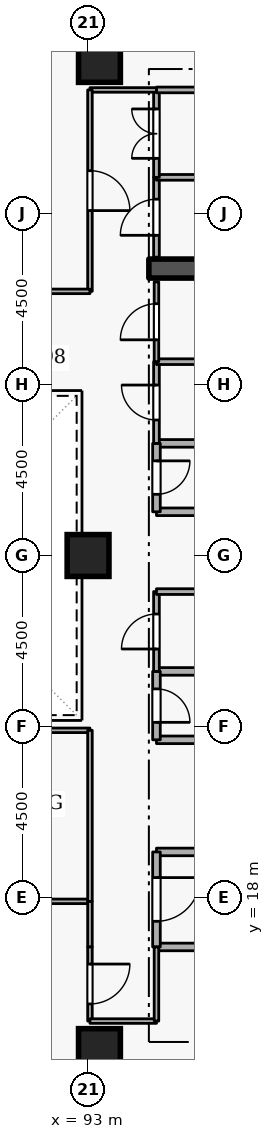
"""IFC4 building model, lengths in metres.
Left out: names, types, materials, properties, quantities, classifications, styles, units other than length and angle.
Written with IfcOpenShell. Run it as: python <this file> out.ifc"""

import sys

from ifc_helpers import new_model, si_unit, direction, frame, frame_2d, origin, origin_2d, place, context, subcontext, project, spatial, rectangle, extrude, element, fill, save


model = new_model("IFC4")
c1 = context("Model", 3, precision=1e-05, world=origin(), true_north=direction((0.0, 1.0)))
c2 = subcontext(c1, "Body", "Model", "MODEL_VIEW")
j1 = project(units=[si_unit("LENGTHUNIT", "METRE"), si_unit("PLANEANGLEUNIT", "RADIAN")], contexts=[c1])
p1 = place(None, origin())
s1 = spatial("IfcSite", under=j1, at=p1, CompositionType="ELEMENT")
p2 = place(p1, origin())
s2 = spatial("IfcBuilding", under=s1, at=p2, CompositionType="ELEMENT")
p3 = place(p2, frame((0.0, 0.0, 185.7)))
s3 = spatial("IfcBuildingStorey", under=s2, at=p3, CompositionType="ELEMENT", Elevation=185.7)
p4 = place(p3, frame((94.6, 34.55, 0.0), z_axis=(0.0, 0.0, 1.0), x_axis=(1.0, 0.0, 0.0)))
e1 = element("IfcWall", 1, at=p4, inside=s3, PredefinedType="SHEAR", context=c2, shape_type="SweptSolid", body=[
    extrude(rectangle(XDim=5.8, YDim=0.5, at=frame_2d((2.9, 0.0))), origin(), (0.0, 0.0, 1.0), 3.6),
])
for number, where, z_axis, x_axis in (
    (2, (93.3, 14.0, 0.0), (0.0, 0.0, 1.0), (1.0, 0.0, 0.0)),
    (3, (93.3, 40.0, 0.0), (0.0, 0.0, 1.0), (1.0, 0.0, 0.0)),
    (4, (93.0, 27.0, 0.0), (0.0, 0.0, 1.0), (1.0, 0.0, 0.0)),
):
    element("IfcColumn", number, at=place(p3, frame(where, z_axis=z_axis, x_axis=x_axis)), inside=s3, PredefinedType="COLUMN", context=c2, shape_type="SweptSolid", body=[
        extrude(rectangle(XDim=1.1, YDim=1.1, at=origin_2d()), origin(), (0.0, 0.0, 1.0), 3.6),
    ])
p5 = place(p3, frame((94.8, 16.7, 0.0), z_axis=(0.0, 0.0, 1.0), x_axis=(1.0, 0.0, 0.0)))
e5 = element("IfcWall", 5, at=p5, inside=s3, PredefinedType="STANDARD", context=c2, shape_type="SweptSolid", body=[
    extrude(rectangle(XDim=5.7, YDim=0.2, at=frame_2d((2.85, 0.0))), origin(), (0.0, 0.0, 1.0), 3.34),
])
p6 = place(p3, frame((97.1, 19.2, 0.0), z_axis=(0.0, 0.0, 1.0), x_axis=(-1.0, 0.0, 0.0)))
e6 = element("IfcWall", 6, at=p6, inside=s3, PredefinedType="STANDARD", context=c2, shape_type="SweptSolid", body=[
    extrude(rectangle(XDim=2.3, YDim=0.2, at=frame_2d((1.15, 0.0))), origin(), (0.0, 0.0, 1.0), 2.545),
])
p7 = place(p3, frame((94.8, 19.2, 0.0), z_axis=(0.0, 0.0, 1.0), x_axis=(0.0, -1.0, 0.0)))
e7 = element("IfcWall", 7, at=p7, inside=s3, PredefinedType="STANDARD", context=c2, shape_type="SweptSolid", body=[
    extrude(rectangle(XDim=2.5, YDim=0.2, at=frame_2d((1.25, 0.0))), origin(), (0.0, 0.0, 1.0), 3.34),
])
p8 = place(p7, frame((0.675, 0.0, 0.0)))
e8 = element("IfcOpeningElement", 8, at=p8, cuts=e7, PredefinedType="OPENING", context=c2, shape_type="SweptSolid", body=[
    extrude(rectangle(XDim=1.15, YDim=2.1, at=frame_2d((0.575, 1.05))), frame((0.0, 0.11, 0.0), z_axis=(0.0, -1.0, 0.0), x_axis=(1.0, 0.0, 0.0)), (0.0, 0.0, 1.0), 0.22),
])
for number, where, z_axis, x_axis in (
    (9, (94.8, 28.15, 0.0), (0.0, 0.0, 1.0), (1.0, 0.0, 0.0)),
    (10, (96.85, 29.95, 0.0), (0.0, 0.0, 1.0), (-1.0, 0.0, 0.0)),
):
    element("IfcWall", number, at=place(p3, frame(where, z_axis=z_axis, x_axis=x_axis)), inside=s3, PredefinedType="STANDARD", context=c2, shape_type="SweptSolid", body=[
        extrude(rectangle(XDim=2.05, YDim=0.2, at=frame_2d((1.025, 0.0))), origin(), (0.0, 0.0, 1.0), 3.34),
    ])
p9 = place(p3, frame((94.8, 29.95, 0.0), z_axis=(0.0, 0.0, 1.0), x_axis=(0.0, -1.0, 0.0)))
e11 = element("IfcWall", 11, at=p9, inside=s3, PredefinedType="STANDARD", context=c2, shape_type="SweptSolid", body=[
    extrude(rectangle(XDim=1.8, YDim=0.2, at=frame_2d((0.9, 0.0))), origin(), (0.0, 0.0, 1.0), 3.34),
])
p10 = place(p9, frame((0.46, 0.0, 0.0)))
e12 = element("IfcOpeningElement", 12, at=p10, cuts=e11, PredefinedType="OPENING", context=c2, shape_type="SweptSolid", body=[
    extrude(rectangle(XDim=0.88, YDim=2.04, at=frame_2d((0.44, 1.02))), frame((0.0, 0.11, 0.0), z_axis=(0.0, -1.0, 0.0), x_axis=(1.0, 0.0, 0.0)), (0.0, 0.0, 1.0), 0.22),
])
for number, where, z_axis, x_axis in (
    (13, (94.8, 22.15, 0.0), (0.0, 0.0, 1.0), (1.0, 0.0, 0.0)),
    (14, (96.85, 23.95, 0.0), (0.0, 0.0, 1.0), (-1.0, 0.0, 0.0)),
):
    element("IfcWall", number, at=place(p3, frame(where, z_axis=z_axis, x_axis=x_axis)), inside=s3, PredefinedType="STANDARD", context=c2, shape_type="SweptSolid", body=[
        extrude(rectangle(XDim=2.05, YDim=0.2, at=frame_2d((1.025, 0.0))), origin(), (0.0, 0.0, 1.0), 3.34),
    ])
p11 = place(p3, frame((94.8, 23.95, 0.0), z_axis=(0.0, 0.0, 1.0), x_axis=(0.0, -1.0, 0.0)))
e15 = element("IfcWall", 15, at=p11, inside=s3, PredefinedType="STANDARD", context=c2, shape_type="SweptSolid", body=[
    extrude(rectangle(XDim=1.8, YDim=0.2, at=frame_2d((0.9, 0.0))), origin(), (0.0, 0.0, 1.0), 3.34),
])
p12 = place(p11, frame((0.46, 0.0, 0.0)))
e16 = element("IfcOpeningElement", 16, at=p12, cuts=e15, PredefinedType="OPENING", context=c2, shape_type="SweptSolid", body=[
    extrude(rectangle(XDim=0.88, YDim=2.04, at=frame_2d((0.44, 1.02))), frame((0.0, 0.11, 0.0), z_axis=(0.0, -1.0, 0.0), x_axis=(1.0, 0.0, 0.0)), (0.0, 0.0, 1.0), 0.22),
])
p13 = place(p3, frame((94.8, 23.95, 0.0), z_axis=(0.0, 0.0, 1.0), x_axis=(0.0, 1.0, 0.0)))
e17 = element("IfcWall", 17, at=p13, inside=s3, PredefinedType="PARTITIONING", context=c2, shape_type="SweptSolid", body=[
    extrude(rectangle(XDim=2.1, YDim=0.15, at=frame_2d((1.05, 0.0))), origin(), (0.0, 0.0, 1.0), 3.34),
])
p14 = place(p13, frame((0.59, 0.0, 0.0)))
e18 = element("IfcOpeningElement", 18, at=p14, cuts=e17, PredefinedType="OPENING", context=c2, shape_type="SweptSolid", body=[
    extrude(rectangle(XDim=0.92, YDim=2.08, at=frame_2d((0.46, 1.04))), frame((0.0, 0.085, 0.0), z_axis=(0.0, -1.0, 0.0), x_axis=(1.0, 0.0, 0.0)), (0.0, 0.0, 1.0), 0.17),
])
p15 = place(p3, frame((94.8, 26.05, 0.0), z_axis=(0.0, 0.0, 1.0), x_axis=(1.0, 0.0, 0.0)))
e19 = element("IfcWall", 19, at=p15, inside=s3, PredefinedType="PARTITIONING", context=c2, shape_type="SweptSolid", body=[
    extrude(rectangle(XDim=2.05, YDim=0.15, at=frame_2d((1.025, 0.0))), origin(), (0.0, 0.0, 1.0), 3.34),
])
p16 = place(p3, frame((94.8, 29.95, 0.0), z_axis=(0.0, 0.0, 1.0), x_axis=(0.0, 1.0, 0.0)))
e20 = element("IfcWall", 20, at=p16, inside=s3, PredefinedType="PARTITIONING", context=c2, shape_type="SweptSolid", body=[
    extrude(rectangle(XDim=2.15, YDim=0.15, at=frame_2d((1.075, 0.0))), origin(), (0.0, 0.0, 1.0), 3.34),
])
p17 = place(p16, frame((0.615, 0.0, 0.0)))
e21 = element("IfcOpeningElement", 21, at=p17, cuts=e20, PredefinedType="OPENING", context=c2, shape_type="SweptSolid", body=[
    extrude(rectangle(XDim=0.92, YDim=2.08, at=frame_2d((0.46, 1.04))), frame((0.0, 0.085, 0.0), z_axis=(0.0, -1.0, 0.0), x_axis=(1.0, 0.0, 0.0)), (0.0, 0.0, 1.0), 0.17),
])
p18 = place(p3, frame((94.8, 32.1, 0.0), z_axis=(0.0, 0.0, 1.0), x_axis=(1.0, 0.0, 0.0)))
e22 = element("IfcWall", 22, at=p18, inside=s3, PredefinedType="PARTITIONING", context=c2, shape_type="SweptSolid", body=[
    extrude(rectangle(XDim=2.05, YDim=0.15, at=frame_2d((1.025, 0.0))), origin(), (0.0, 0.0, 1.0), 3.34),
])
p19 = place(p3, frame((94.8, 32.1, 0.0), z_axis=(0.0, 0.0, 1.0), x_axis=(0.0, 1.0, 0.0)))
e23 = element("IfcWall", 23, at=p19, inside=s3, PredefinedType="PARTITIONING", context=c2, shape_type="SweptSolid", body=[
    extrude(rectangle(XDim=2.1, YDim=0.12, at=frame_2d((1.05, 0.0))), origin(), (0.0, 0.0, 1.0), 3.34),
])
p20 = place(p19, frame((0.575, 0.0, 0.0)))
e24 = element("IfcOpeningElement", 24, at=p20, cuts=e23, PredefinedType="OPENING", context=c2, shape_type="SweptSolid", body=[
    extrude(rectangle(XDim=0.95, YDim=2.1, at=frame_2d((0.475, 1.05))), frame((0.0, 0.07, 0.0), z_axis=(0.0, -1.0, 0.0), x_axis=(1.0, 0.0, 0.0)), (0.0, 0.0, 1.0), 0.14),
])
p21 = place(p3, frame((94.8, 34.85, 0.0), z_axis=(0.0, 0.0, 1.0), x_axis=(0.0, 1.0, 0.0)))
e25 = element("IfcWall", 25, at=p21, inside=s3, PredefinedType="PARTITIONING", context=c2, shape_type="SweptSolid", body=[
    extrude(rectangle(XDim=2.1, YDim=0.15, at=frame_2d((1.05, 0.0))), origin(), (0.0, 0.0, 1.0), 3.34),
])
p22 = place(p21, frame((0.575, 0.0, 0.0)))
e26 = element("IfcOpeningElement", 26, at=p22, cuts=e25, PredefinedType="OPENING", context=c2, shape_type="SweptSolid", body=[
    extrude(rectangle(XDim=0.95, YDim=2.1, at=frame_2d((0.475, 1.05))), frame((0.0, 0.085, 0.0), z_axis=(0.0, -1.0, 0.0), x_axis=(1.0, 0.0, 0.0)), (0.0, 0.0, 1.0), 0.17),
])
p23 = place(p3, frame((94.8, 36.95, 0.0), z_axis=(0.0, 0.0, 1.0), x_axis=(1.0, 0.0, 0.0)))
e27 = element("IfcWall", 27, at=p23, inside=s3, PredefinedType="PARTITIONING", context=c2, shape_type="SweptSolid", body=[
    extrude(rectangle(XDim=5.65, YDim=0.15, at=frame_2d((2.825, 0.0))), origin(), (0.0, 0.0, 1.0), 3.34),
])
p24 = place(p3, frame((94.8, 36.95, 0.0), z_axis=(0.0, 0.0, 1.0), x_axis=(0.0, 1.0, 0.0)))
e28 = element("IfcWall", 28, at=p24, inside=s3, PredefinedType="PARTITIONING", context=c2, shape_type="SweptSolid", body=[
    extrude(rectangle(XDim=2.3, YDim=0.15, at=frame_2d((1.15, 0.0))), origin(), (0.0, 0.0, 1.0), 3.34),
])
p25 = place(p24, frame((0.5, 0.0, 0.0)))
e29 = element("IfcOpeningElement", 29, at=p25, cuts=e28, PredefinedType="OPENING", context=c2, shape_type="SweptSolid", body=[
    extrude(rectangle(XDim=1.3, YDim=2.12, at=frame_2d((0.65, 1.06))), frame((0.0, 0.085, 0.0), z_axis=(0.0, -1.0, 0.0), x_axis=(1.0, 0.0, 0.0)), (0.0, 0.0, 1.0), 0.17),
])
p26 = place(p3, frame((94.8, 39.25, 0.0), z_axis=(0.0, 0.0, 1.0), x_axis=(1.0, 0.0, 0.0)))
e30 = element("IfcWall", 30, at=p26, inside=s3, PredefinedType="PARTITIONING", context=c2, shape_type="SweptSolid", body=[
    extrude(rectangle(XDim=5.65, YDim=0.15, at=frame_2d((2.825, 0.0))), origin(), (0.0, 0.0, 1.0), 3.34),
])
p27 = place(p3, frame((88.5, 17.9, 0.0), z_axis=(0.0, 0.0, 1.0), x_axis=(1.0, 0.0, 0.0)))
e31 = element("IfcWall", 31, at=p27, inside=s3, PredefinedType="PARTITIONING", context=c2, shape_type="SweptSolid", body=[
    extrude(rectangle(XDim=4.55, YDim=0.12, at=frame_2d((2.275, 0.0))), origin(), (0.0, 0.0, 1.0), 3.34),
])
p28 = place(p3, frame((93.05, 17.9, 0.0), z_axis=(0.0, 0.0, 1.0), x_axis=(0.0, -1.0, 0.0)))
e32 = element("IfcWall", 32, at=p28, inside=s3, PredefinedType="PARTITIONING", context=c2, shape_type="SweptSolid", body=[
    extrude(rectangle(XDim=1.2, YDim=0.12, at=frame_2d((0.6, 0.0))), origin(), (0.0, 0.0, 1.0), 3.34),
])
p29 = place(p3, frame((93.05, 16.7, 0.0), z_axis=(0.0, 0.0, 1.0), x_axis=(0.0, -1.0, 0.0)))
e33 = element("IfcWall", 33, at=p29, inside=s3, PredefinedType="PARTITIONING", context=c2, shape_type="SweptSolid", body=[
    extrude(rectangle(XDim=1.95, YDim=0.12, at=frame_2d((0.975, 0.0))), origin(), (0.0, 0.0, 1.0), 3.34),
])
p30 = place(p29, frame((0.45, 0.0, 0.0)))
e34 = element("IfcOpeningElement", 34, at=p30, cuts=e33, PredefinedType="OPENING", context=c2, shape_type="SweptSolid", body=[
    extrude(rectangle(XDim=1.05, YDim=2.1, at=frame_2d((0.525, 1.05))), frame((0.0, 0.07, 0.0), z_axis=(0.0, -1.0, 0.0), x_axis=(1.0, 0.0, 0.0)), (0.0, 0.0, 1.0), 0.14),
])
p31 = place(p3, frame((93.05, 14.75, 0.0), z_axis=(0.0, 0.0, 1.0), x_axis=(1.0, 0.0, 0.0)))
e35 = element("IfcWall", 35, at=p31, inside=s3, PredefinedType="PARTITIONING", context=c2, shape_type="SweptSolid", body=[
    extrude(rectangle(XDim=1.75, YDim=0.12, at=frame_2d((0.875, 0.0))), origin(), (0.0, 0.0, 1.0), 3.34),
])
p32 = place(p3, frame((94.8, 14.75, 0.0), z_axis=(0.0, 0.0, 1.0), x_axis=(0.0, 1.0, 0.0)))
e36 = element("IfcWall", 36, at=p32, inside=s3, PredefinedType="PARTITIONING", context=c2, shape_type="SweptSolid", body=[
    extrude(rectangle(XDim=1.95, YDim=0.12, at=frame_2d((0.975, 0.0))), origin(), (0.0, 0.0, 1.0), 3.34),
])
p33 = place(p3, frame((83.95, 22.4, 0.0), z_axis=(0.0, 0.0, 1.0), x_axis=(1.0, 0.0, 0.0)))
e37 = element("IfcWall", 37, at=p33, inside=s3, PredefinedType="PARTITIONING", context=c2, shape_type="SweptSolid", body=[
    extrude(rectangle(XDim=9.1, YDim=0.12, at=frame_2d((4.55, 0.0))), origin(), (0.0, 0.0, 1.0), 3.34),
])
p34 = place(p3, frame((93.05, 22.4, 0.0), z_axis=(0.0, 0.0, 1.0), x_axis=(0.0, -1.0, 0.0)))
e38 = element("IfcWall", 38, at=p34, inside=s3, PredefinedType="PARTITIONING", context=c2, shape_type="SweptSolid", body=[
    extrude(rectangle(XDim=4.5, YDim=0.12, at=frame_2d((2.25, 0.0))), origin(), (0.0, 0.0, 1.0), 3.34),
])
p35 = place(p3, frame((94.8, 39.25, 0.0), z_axis=(0.0, 0.0, 1.0), x_axis=(-1.0, 0.0, 0.0)))
e39 = element("IfcWall", 39, at=p35, inside=s3, PredefinedType="PARTITIONING", context=c2, shape_type="SweptSolid", body=[
    extrude(rectangle(XDim=1.75, YDim=0.12, at=frame_2d((0.875, 0.0))), origin(), (0.0, 0.0, 1.0), 3.34),
])
p36 = place(p3, frame((93.05, 39.25, 0.0), z_axis=(0.0, 0.0, 1.0), x_axis=(0.0, -1.0, 0.0)))
e40 = element("IfcWall", 40, at=p36, inside=s3, PredefinedType="PARTITIONING", context=c2, shape_type="SweptSolid", body=[
    extrude(rectangle(XDim=5.3, YDim=0.12, at=frame_2d((2.65, 0.0))), origin(), (0.0, 0.0, 1.0), 3.34),
])
p37 = place(p36, frame((2.125, 0.0, 0.0)))
e41 = element("IfcOpeningElement", 41, at=p37, cuts=e40, PredefinedType="OPENING", context=c2, shape_type="SweptSolid", body=[
    extrude(rectangle(XDim=1.05, YDim=2.1, at=frame_2d((0.525, 1.05))), frame((0.0, 0.07, 0.0), z_axis=(0.0, -1.0, 0.0), x_axis=(1.0, 0.0, 0.0)), (0.0, 0.0, 1.0), 0.14),
])
p38 = place(p3, frame((93.05, 33.95, 0.0), z_axis=(0.0, 0.0, 1.0), x_axis=(-1.0, 0.0, 0.0)))
e42 = element("IfcWall", 42, at=p38, inside=s3, PredefinedType="PARTITIONING", context=c2, shape_type="SweptSolid", body=[
    extrude(rectangle(XDim=2.95, YDim=0.12, at=frame_2d((1.475, 0.0))), origin(), (0.0, 0.0, 1.0), 3.34),
])
p39 = place(p8, origin())
e43 = element("IfcDoor", 43, at=p39, inside=s3, OperationType="SINGLE_SWING_LEFT", PredefinedType="DOOR", context=c2, shape_type="SweptSolid", body=[
    extrude(rectangle(XDim=1.15, YDim=2.1, at=frame_2d((0.575, 1.05))), frame((0.0, 0.025, 0.0), z_axis=(0.0, -1.0, 0.0), x_axis=(1.0, 0.0, 0.0)), (0.0, 0.0, 1.0), 0.05),
])
fill(e8, e43)
p40 = place(p10, origin())
e44 = element("IfcDoor", 44, at=p40, inside=s3, OperationType="SINGLE_SWING_LEFT", PredefinedType="DOOR", context=c2, shape_type="SweptSolid", body=[
    extrude(rectangle(XDim=0.88, YDim=2.04, at=frame_2d((0.44, 1.02))), frame((0.0, 0.025, 0.0), z_axis=(0.0, -1.0, 0.0), x_axis=(1.0, 0.0, 0.0)), (0.0, 0.0, 1.0), 0.05),
])
fill(e12, e44)
p41 = place(p12, origin())
e45 = element("IfcDoor", 45, at=p41, inside=s3, OperationType="SINGLE_SWING_RIGHT", PredefinedType="DOOR", context=c2, shape_type="SweptSolid", body=[
    extrude(rectangle(XDim=0.88, YDim=2.04, at=frame_2d((0.44, 1.02))), frame((0.0, 0.025, 0.0), z_axis=(0.0, -1.0, 0.0), x_axis=(1.0, 0.0, 0.0)), (0.0, 0.0, 1.0), 0.05),
])
fill(e16, e45)
p42 = place(p14, origin())
e46 = element("IfcDoor", 46, at=p42, inside=s3, OperationType="SINGLE_SWING_LEFT", PredefinedType="DOOR", context=c2, shape_type="SweptSolid", body=[
    extrude(rectangle(XDim=0.92, YDim=2.08, at=frame_2d((0.46, 1.04))), frame((0.0, 0.025, 0.0), z_axis=(0.0, -1.0, 0.0), x_axis=(1.0, 0.0, 0.0)), (0.0, 0.0, 1.0), 0.05),
])
fill(e18, e46)
p43 = place(p17, origin())
e47 = element("IfcDoor", 47, at=p43, inside=s3, OperationType="SINGLE_SWING_RIGHT", PredefinedType="DOOR", context=c2, shape_type="SweptSolid", body=[
    extrude(rectangle(XDim=0.92, YDim=2.08, at=frame_2d((0.46, 1.04))), frame((0.0, 0.025, 0.0), z_axis=(0.0, -1.0, 0.0), x_axis=(1.0, 0.0, 0.0)), (0.0, 0.0, 1.0), 0.05),
])
fill(e21, e47)
p44 = place(p20, origin())
e48 = element("IfcDoor", 48, at=p44, inside=s3, OperationType="SINGLE_SWING_LEFT", PredefinedType="DOOR", context=c2, shape_type="SweptSolid", body=[
    extrude(rectangle(XDim=0.95, YDim=2.1, at=frame_2d((0.475, 1.05))), frame((0.0, 0.025, 0.0), z_axis=(0.0, -1.0, 0.0), x_axis=(1.0, 0.0, 0.0)), (0.0, 0.0, 1.0), 0.05),
])
fill(e24, e48)
p45 = place(p22, origin())
e49 = element("IfcDoor", 49, at=p45, inside=s3, OperationType="SINGLE_SWING_LEFT", PredefinedType="DOOR", context=c2, shape_type="SweptSolid", body=[
    extrude(rectangle(XDim=0.95, YDim=2.1, at=frame_2d((0.475, 1.05))), frame((0.0, 0.025, 0.0), z_axis=(0.0, -1.0, 0.0), x_axis=(1.0, 0.0, 0.0)), (0.0, 0.0, 1.0), 0.05),
])
fill(e26, e49)
p46 = place(p25, origin())
e50 = element("IfcDoor", 50, at=p46, inside=s3, OperationType="DOUBLE_DOOR_SINGLE_SWING", PredefinedType="DOOR", context=c2, shape_type="SweptSolid", body=[
    extrude(rectangle(XDim=1.3, YDim=2.12, at=frame_2d((0.65, 1.06))), frame((0.0, 0.025, 0.0), z_axis=(0.0, -1.0, 0.0), x_axis=(1.0, 0.0, 0.0)), (0.0, 0.0, 1.0), 0.05),
])
fill(e29, e50)
p47 = place(p30, origin())
e51 = element("IfcDoor", 51, at=p47, inside=s3, OperationType="SINGLE_SWING_LEFT", PredefinedType="DOOR", context=c2, shape_type="SweptSolid", body=[
    extrude(rectangle(XDim=1.05, YDim=2.1, at=frame_2d((0.525, 1.05))), frame((0.0, 0.025, 0.0), z_axis=(0.0, -1.0, 0.0), x_axis=(1.0, 0.0, 0.0)), (0.0, 0.0, 1.0), 0.05),
])
fill(e34, e51)
p48 = place(p37, origin())
e52 = element("IfcDoor", 52, at=p48, inside=s3, OperationType="SINGLE_SWING_RIGHT", PredefinedType="DOOR", context=c2, shape_type="SweptSolid", body=[
    extrude(rectangle(XDim=1.05, YDim=2.1, at=frame_2d((0.525, 1.05))), frame((0.0, 0.025, 0.0), z_axis=(0.0, -1.0, 0.0), x_axis=(1.0, 0.0, 0.0)), (0.0, 0.0, 1.0), 0.05),
])
fill(e41, e52)
save(model, sys.argv[1])
